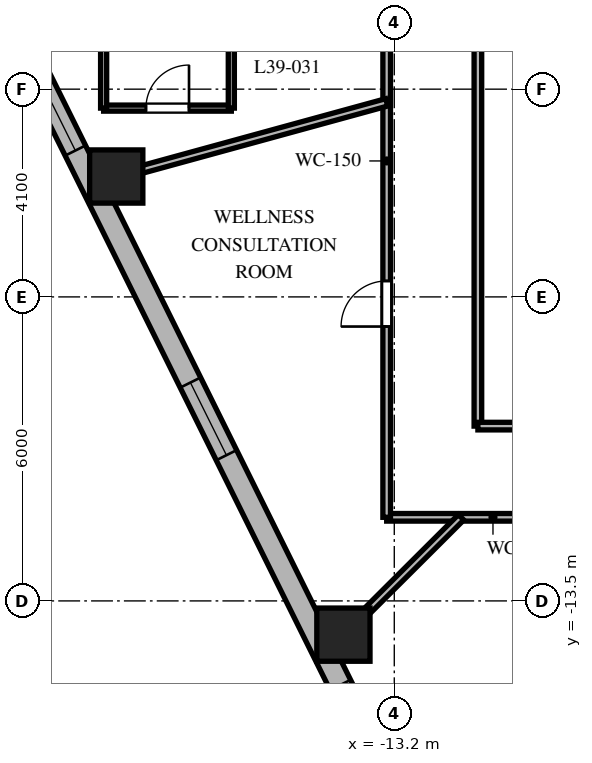
"""IFC4 building model, lengths in metres.
Left out: names, types, materials, properties, quantities, classifications, styles, units other than length and angle.
Written with IfcOpenShell. Run it as: python <this file> out.ifc"""

import sys

from ifc_helpers import new_model, si_unit, direction, frame, frame_2d, origin, origin_2d, place, context, subcontext, project, spatial, rectangle, extrude, element, fill, save


model = new_model("IFC4")
c1 = context("Model", 3, precision=1e-05, world=origin(), true_north=direction((0.0, 1.0)))
c2 = subcontext(c1, "Body", "Model", "MODEL_VIEW")
j1 = project(units=[si_unit("LENGTHUNIT", "METRE"), si_unit("PLANEANGLEUNIT", "RADIAN")], contexts=[c1])
p1 = place(None, origin())
s1 = spatial("IfcSite", under=j1, at=p1, CompositionType="ELEMENT")
p2 = place(p1, origin())
s2 = spatial("IfcBuilding", under=s1, at=p2, CompositionType="ELEMENT")
p3 = place(p2, frame((0.0, 0.0, 159.1)))
s3 = spatial("IfcBuildingStorey", under=s2, at=p3, CompositionType="ELEMENT", Elevation=159.1)
for number, where, z_axis, x_axis in (
    (1, (-18.687, -5.124, 0.0), (0.0, 0.0, 1.0), (1.0, 0.0, 0.0)),
    (2, (-14.204, -14.166, 0.0), (0.0, 0.0, 1.0), (1.0, 0.0, 0.0)),
):
    element("IfcColumn", number, at=place(p3, frame(where, z_axis=z_axis, x_axis=x_axis)), inside=s3, PredefinedType="COLUMN", context=c2, shape_type="SweptSolid", body=[
        extrude(rectangle(XDim=1.05, YDim=1.05, at=origin_2d()), origin(), (0.0, 0.0, 1.0), 3.7),
    ])
p4 = place(p3, frame((-20.618, -2.344, 0.0), z_axis=(0.0, 0.0, 1.0), x_axis=(0.444243691097, -0.895905990002, 0.0)))
e3 = element("IfcWall", 3, at=p4, inside=s3, PredefinedType="SOLIDWALL", context=c2, shape_type="SweptSolid", body=[
    extrude(rectangle(XDim=16.784, YDim=0.45, at=frame_2d((8.392, 0.0))), origin(), (0.0, 0.0, 1.0), 3.4),
])
p5 = place(p4, frame((0.931, 0.0, 0.8)))
e4 = element("IfcOpeningElement", 4, at=p5, cuts=e3, PredefinedType="OPENING", context=c2, shape_type="SweptSolid", body=[
    extrude(rectangle(XDim=1.6, YDim=1.75, at=frame_2d((0.8, 0.875))), frame((0.0, 0.235, 0.0), z_axis=(0.0, -1.0, 0.0), x_axis=(1.0, 0.0, 0.0)), (0.0, 0.0, 1.0), 0.47),
])
p6 = place(p4, frame((7.642, 0.0, 0.8)))
e5 = element("IfcOpeningElement", 5, at=p6, cuts=e3, PredefinedType="OPENING", context=c2, shape_type="SweptSolid", body=[
    extrude(rectangle(XDim=1.6, YDim=1.75, at=frame_2d((0.8, 0.875))), frame((0.0, 0.235, 0.0), z_axis=(0.0, -1.0, 0.0), x_axis=(1.0, 0.0, 0.0)), (0.0, 0.0, 1.0), 0.47),
])
p7 = place(p4, frame((14.303, 0.0, 0.8)))
e6 = element("IfcOpeningElement", 6, at=p7, cuts=e3, PredefinedType="OPENING", context=c2, shape_type="SweptSolid", body=[
    extrude(rectangle(XDim=1.6, YDim=1.75, at=frame_2d((0.8, 0.875))), frame((0.0, 0.235, 0.0), z_axis=(0.0, -1.0, 0.0), x_axis=(1.0, 0.0, 0.0)), (0.0, 0.0, 1.0), 0.47),
])
p8 = place(p3, frame((13.35, -11.85, 0.0), z_axis=(0.0, 0.0, 1.0), x_axis=(-1.0, 0.0, 0.0)))
e7 = element("IfcWall", 7, at=p8, inside=s3, PredefinedType="PARTITIONING", context=c2, shape_type="SweptSolid", body=[
    extrude(rectangle(XDim=26.7, YDim=0.15, at=frame_2d((13.35, 0.0))), origin(), (0.0, 0.0, 1.0), 2.84),
])
p9 = place(p8, frame((20.682, 0.0, 0.0)))
e8 = element("IfcOpeningElement", 8, at=p9, cuts=e7, PredefinedType="OPENING", context=c2, shape_type="SweptSolid", body=[
    extrude(rectangle(XDim=0.95, YDim=2.03, at=frame_2d((0.475, 1.015))), frame((0.0, 0.085, 0.0), z_axis=(0.0, -1.0, 0.0), x_axis=(1.0, 0.0, 0.0)), (0.0, 0.0, 1.0), 0.17),
])
p10 = place(p8, frame((14.708, 0.0, 0.0)))
e9 = element("IfcOpeningElement", 9, at=p10, cuts=e7, PredefinedType="OPENING", context=c2, shape_type="SweptSolid", body=[
    extrude(rectangle(XDim=0.95, YDim=2.03, at=frame_2d((0.475, 1.015))), frame((0.0, 0.085, 0.0), z_axis=(0.0, -1.0, 0.0), x_axis=(1.0, 0.0, 0.0)), (0.0, 0.0, 1.0), 0.17),
])
p11 = place(p8, frame((10.553, 0.0, 0.0)))
e10 = element("IfcOpeningElement", 10, at=p11, cuts=e7, PredefinedType="OPENING", context=c2, shape_type="SweptSolid", body=[
    extrude(rectangle(XDim=0.95, YDim=2.03, at=frame_2d((0.475, 1.015))), frame((0.0, 0.085, 0.0), z_axis=(0.0, -1.0, 0.0), x_axis=(1.0, 0.0, 0.0)), (0.0, 0.0, 1.0), 0.17),
])
p12 = place(p8, frame((6.353, 0.0, 0.0)))
e11 = element("IfcOpeningElement", 11, at=p12, cuts=e7, PredefinedType="OPENING", context=c2, shape_type="SweptSolid", body=[
    extrude(rectangle(XDim=0.9, YDim=2.03, at=frame_2d((0.45, 1.015))), frame((0.0, 0.085, 0.0), z_axis=(0.0, -1.0, 0.0), x_axis=(1.0, 0.0, 0.0)), (0.0, 0.0, 1.0), 0.17),
])
p13 = place(p8, frame((2.15, 0.0, 0.0)))
e12 = element("IfcOpeningElement", 12, at=p13, cuts=e7, PredefinedType="OPENING", context=c2, shape_type="SweptSolid", body=[
    extrude(rectangle(XDim=0.9, YDim=2.03, at=frame_2d((0.45, 1.015))), frame((0.0, 0.085, 0.0), z_axis=(0.0, -1.0, 0.0), x_axis=(1.0, 0.0, 0.0)), (0.0, 0.0, 1.0), 0.17),
])
p14 = place(p3, frame((-13.35, -11.85, 0.0), z_axis=(0.0, 0.0, 1.0), x_axis=(0.0, 1.0, 0.0)))
e13 = element("IfcWall", 13, at=p14, inside=s3, PredefinedType="PARTITIONING", context=c2, shape_type="SweptSolid", body=[
    extrude(rectangle(XDim=23.7, YDim=0.15, at=frame_2d((11.85, 0.0))), origin(), (0.0, 0.0, 1.0), 2.84),
])
p15 = place(p14, frame((20.136, 0.0, 0.0)))
e14 = element("IfcOpeningElement", 14, at=p15, cuts=e13, PredefinedType="OPENING", context=c2, shape_type="SweptSolid", body=[
    extrude(rectangle(XDim=0.9, YDim=2.03, at=frame_2d((0.45, 1.015))), frame((0.0, 0.085, 0.0), z_axis=(0.0, -1.0, 0.0), x_axis=(1.0, 0.0, 0.0)), (0.0, 0.0, 1.0), 0.17),
])
p16 = place(p14, frame((15.551, 0.0, 0.0)))
e15 = element("IfcOpeningElement", 15, at=p16, cuts=e13, PredefinedType="OPENING", context=c2, shape_type="SweptSolid", body=[
    extrude(rectangle(XDim=0.9, YDim=2.03, at=frame_2d((0.45, 1.015))), frame((0.0, 0.085, 0.0), z_axis=(0.0, -1.0, 0.0), x_axis=(1.0, 0.0, 0.0)), (0.0, 0.0, 1.0), 0.17),
])
p17 = place(p14, frame((12.494, 0.0, 0.0)))
e16 = element("IfcOpeningElement", 16, at=p17, cuts=e13, PredefinedType="OPENING", context=c2, shape_type="SweptSolid", body=[
    extrude(rectangle(XDim=0.9, YDim=2.03, at=frame_2d((0.45, 1.015))), frame((0.0, 0.085, 0.0), z_axis=(0.0, -1.0, 0.0), x_axis=(1.0, 0.0, 0.0)), (0.0, 0.0, 1.0), 0.17),
])
p18 = place(p14, frame((9.424, 0.0, 0.0)))
e17 = element("IfcOpeningElement", 17, at=p18, cuts=e13, PredefinedType="OPENING", context=c2, shape_type="SweptSolid", body=[
    extrude(rectangle(XDim=0.95, YDim=2.03, at=frame_2d((0.475, 1.015))), frame((0.0, 0.085, 0.0), z_axis=(0.0, -1.0, 0.0), x_axis=(1.0, 0.0, 0.0)), (0.0, 0.0, 1.0), 0.17),
])
p19 = place(p14, frame((3.765, 0.0, 0.0)))
e18 = element("IfcOpeningElement", 18, at=p19, cuts=e13, PredefinedType="OPENING", context=c2, shape_type="SweptSolid", body=[
    extrude(rectangle(XDim=0.9, YDim=2.03, at=frame_2d((0.45, 1.015))), frame((0.0, 0.085, 0.0), z_axis=(0.0, -1.0, 0.0), x_axis=(1.0, 0.0, 0.0)), (0.0, 0.0, 1.0), 0.17),
])
p20 = place(p3, frame((-11.55, 2.7, 0.0), z_axis=(0.0, 0.0, 1.0), x_axis=(0.0, -1.0, 0.0)))
e19 = element("IfcWall", 19, at=p20, inside=s3, PredefinedType="PARTITIONING", context=c2, shape_type="SweptSolid", body=[
    extrude(rectangle(XDim=12.75, YDim=0.15, at=frame_2d((6.375, 0.0))), origin(), (0.0, 0.0, 1.0), 2.84),
])
p21 = place(p3, frame((-11.55, -10.05, 0.0), z_axis=(0.0, 0.0, 1.0), x_axis=(1.0, 0.0, 0.0)))
e20 = element("IfcWall", 20, at=p21, inside=s3, PredefinedType="PARTITIONING", context=c2, shape_type="SweptSolid", body=[
    extrude(rectangle(XDim=11.55, YDim=0.15, at=frame_2d((5.775, 0.0))), origin(), (0.0, 0.0, 1.0), 2.84),
])
p22 = place(p3, frame((-13.35, -3.661, 0.0), z_axis=(0.0, 0.0, 1.0), x_axis=(-0.964397145454, -0.264458211898, 0.0)))
e21 = element("IfcWall", 21, at=p22, inside=s3, PredefinedType="PARTITIONING", context=c2, shape_type="SweptSolid", body=[
    extrude(rectangle(XDim=6.039, YDim=0.15, at=frame_2d((3.019, 0.0))), origin(), (0.0, 0.0, 1.0), 2.64),
])
p23 = place(p3, frame((-11.882, -11.85, 0.0), z_axis=(0.0, 0.0, 1.0), x_axis=(-0.708037373639, -0.706174962407, 0.0)))
e22 = element("IfcWall", 22, at=p23, inside=s3, PredefinedType="PARTITIONING", context=c2, shape_type="SweptSolid", body=[
    extrude(rectangle(XDim=3.802, YDim=0.15, at=frame_2d((1.901, 0.0))), origin(), (0.0, 0.0, 1.0), 2.64),
])
p24 = place(p3, frame((-18.936, -3.774, 0.0), z_axis=(0.0, 0.0, 1.0), x_axis=(1.0, 0.0, 0.0)))
e23 = element("IfcWall", 23, at=p24, inside=s3, PredefinedType="PARTITIONING", context=c2, shape_type="SweptSolid", body=[
    extrude(rectangle(XDim=2.52, YDim=0.12, at=frame_2d((1.26, 0.0))), origin(), (0.0, 0.0, 1.0), 2.64),
])
p25 = place(p24, frame((0.835, 0.0, 0.0)))
e24 = element("IfcOpeningElement", 24, at=p25, cuts=e23, PredefinedType="OPENING", context=c2, shape_type="SweptSolid", body=[
    extrude(rectangle(XDim=0.85, YDim=2.03, at=frame_2d((0.425, 1.015))), frame((0.0, 0.07, 0.0), z_axis=(0.0, -1.0, 0.0), x_axis=(1.0, 0.0, 0.0)), (0.0, 0.0, 1.0), 0.14),
])
p26 = place(p3, frame((-16.416, -3.774, 0.0), z_axis=(0.0, 0.0, 1.0), x_axis=(0.0, 1.0, 0.0)))
e25 = element("IfcWall", 25, at=p26, inside=s3, PredefinedType="PARTITIONING", context=c2, shape_type="SweptSolid", body=[
    extrude(rectangle(XDim=2.68, YDim=0.12, at=frame_2d((1.34, 0.0))), origin(), (0.0, 0.0, 1.0), 3.4),
])
p27 = place(p3, frame((-18.936, -1.094, 0.0), z_axis=(0.0, 0.0, 1.0), x_axis=(0.0, -1.0, 0.0)))
e26 = element("IfcWall", 26, at=p27, inside=s3, PredefinedType="PARTITIONING", context=c2, shape_type="SweptSolid", body=[
    extrude(rectangle(XDim=2.68, YDim=0.12, at=frame_2d((1.34, 0.0))), origin(), (0.0, 0.0, 1.0), 2.64),
])
p28 = place(p5, origin())
e27 = element("IfcWindow", 27, at=p28, inside=s3, PartitioningType="SINGLE_PANEL", PredefinedType="WINDOW", context=c2, shape_type="SweptSolid", body=[
    extrude(rectangle(XDim=1.6, YDim=1.75, at=frame_2d((0.8, 0.875))), frame((0.0, 0.03, 0.0), z_axis=(0.0, -1.0, 0.0), x_axis=(1.0, 0.0, 0.0)), (0.0, 0.0, 1.0), 0.06),
])
fill(e4, e27)
p29 = place(p6, origin())
e28 = element("IfcWindow", 28, at=p29, inside=s3, PartitioningType="SINGLE_PANEL", PredefinedType="WINDOW", context=c2, shape_type="SweptSolid", body=[
    extrude(rectangle(XDim=1.6, YDim=1.75, at=frame_2d((0.8, 0.875))), frame((0.0, 0.03, 0.0), z_axis=(0.0, -1.0, 0.0), x_axis=(1.0, 0.0, 0.0)), (0.0, 0.0, 1.0), 0.06),
])
fill(e5, e28)
p30 = place(p25, origin())
e29 = element("IfcDoor", 29, at=p30, inside=s3, OperationType="SINGLE_SWING_RIGHT", PredefinedType="DOOR", context=c2, shape_type="SweptSolid", body=[
    extrude(rectangle(XDim=0.85, YDim=2.03, at=frame_2d((0.425, 1.015))), frame((0.0, 0.025, 0.0), z_axis=(0.0, -1.0, 0.0), x_axis=(1.0, 0.0, 0.0)), (0.0, 0.0, 1.0), 0.05),
])
fill(e24, e29)
p31 = place(p19, origin())
e30 = element("IfcDoor", 30, at=p31, inside=s3, OperationType="SINGLE_SWING_LEFT", PredefinedType="DOOR", context=c2, shape_type="SweptSolid", body=[
    extrude(rectangle(XDim=0.9, YDim=2.03, at=frame_2d((0.45, 1.015))), frame((0.0, 0.025, 0.0), z_axis=(0.0, -1.0, 0.0), x_axis=(1.0, 0.0, 0.0)), (0.0, 0.0, 1.0), 0.05),
])
fill(e18, e30)
save(model, sys.argv[1])
